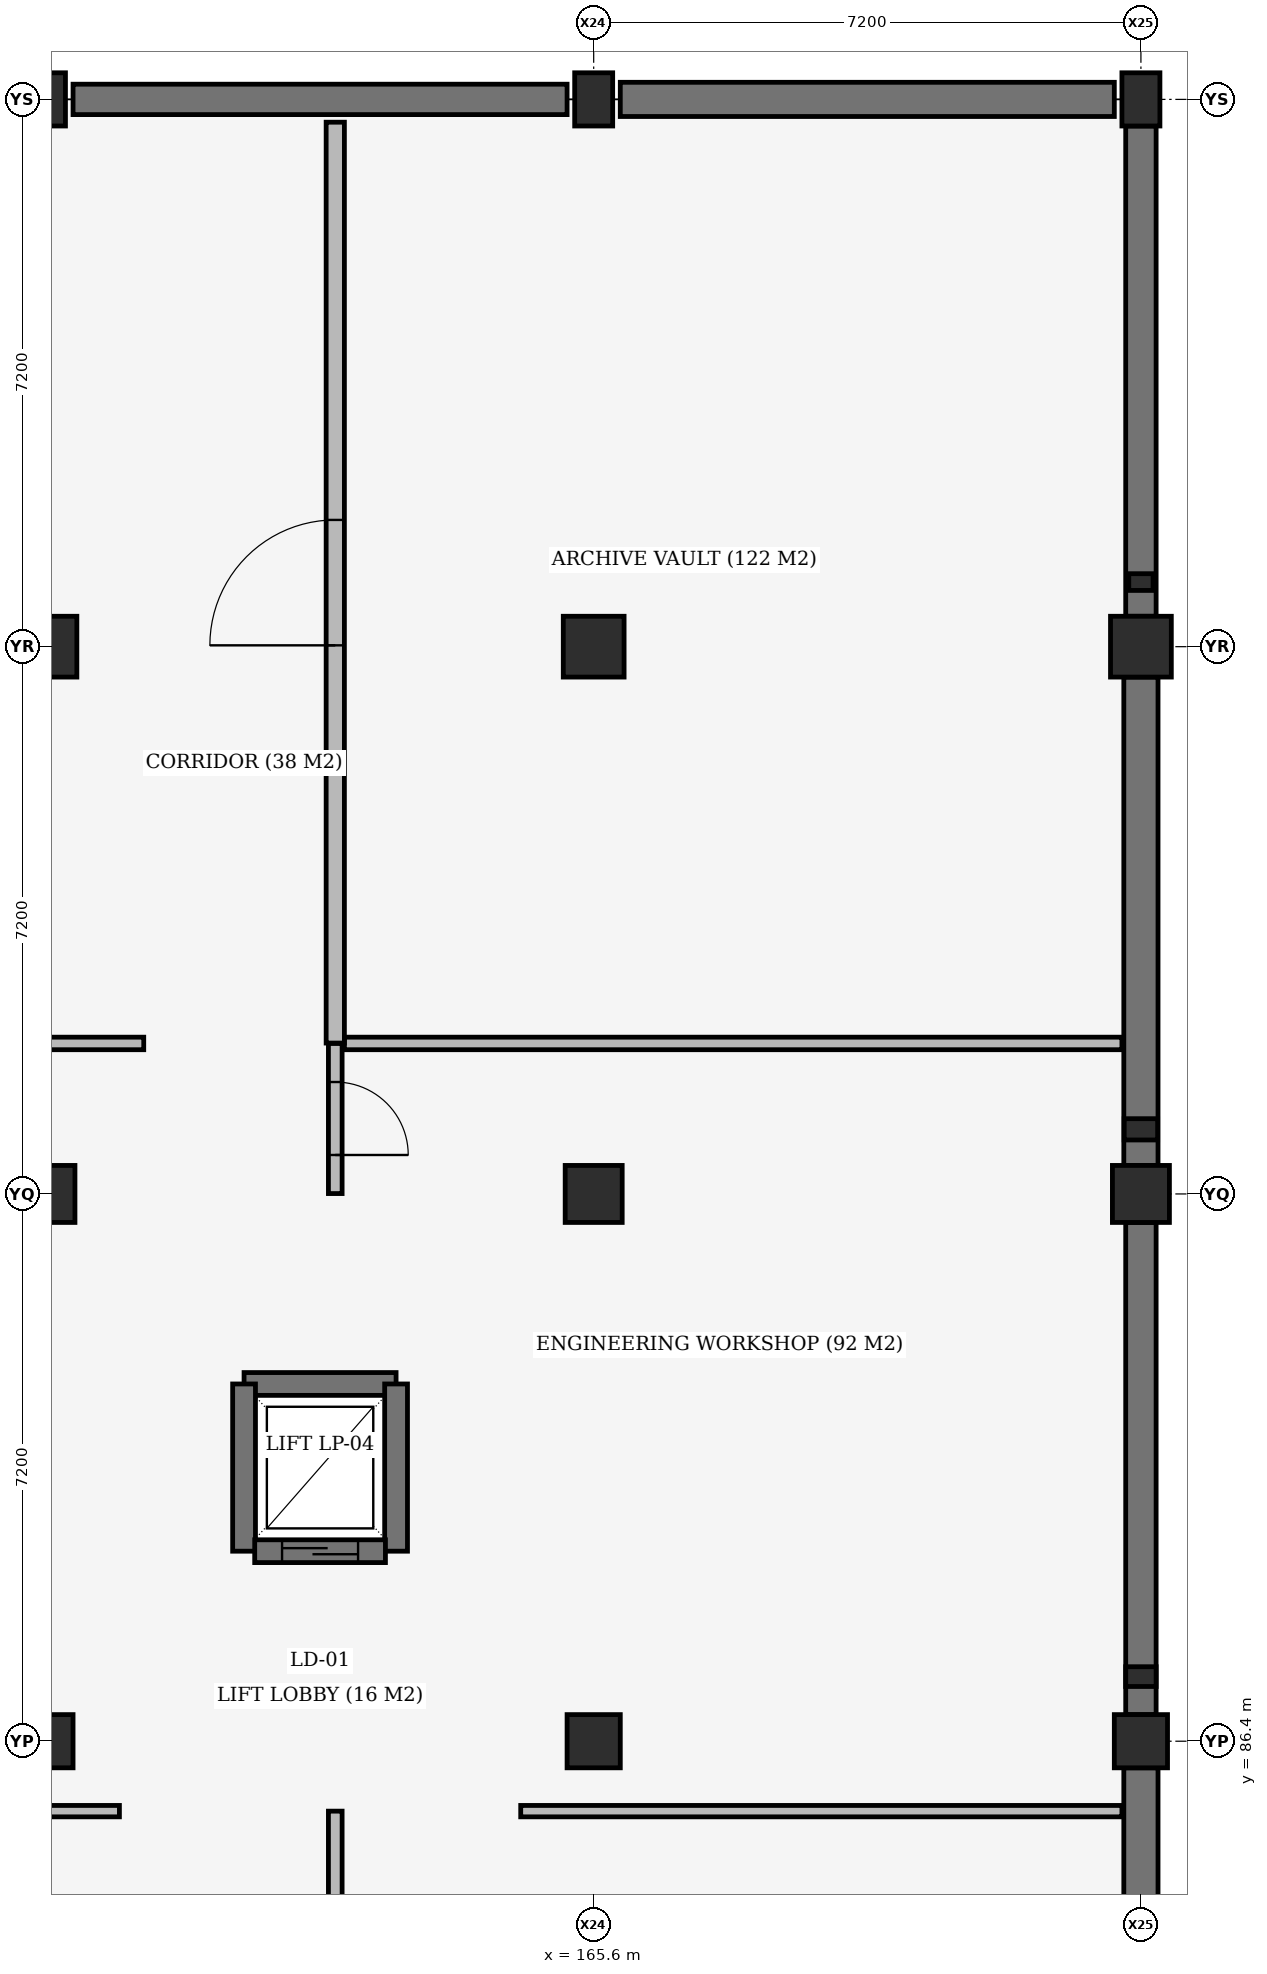
"""IFC4 building model, lengths in metres.
Left out: names, types, materials, properties, quantities, classifications, styles, units other than length and angle.
Written with IfcOpenShell. Run it as: python <this file> out.ifc"""

import sys

from ifc_helpers import new_model, si_unit, direction, frame, frame_2d, origin, origin_2d, place, context, subcontext, project, spatial, rectangle, extrude, element, fill, save


model = new_model("IFC4")
c1 = context("Model", 3, precision=1e-05, world=origin(), true_north=direction((0.0, 1.0)))
c2 = subcontext(c1, "Body", "Model", "MODEL_VIEW")
j1 = project(units=[si_unit("LENGTHUNIT", "METRE"), si_unit("PLANEANGLEUNIT", "RADIAN")], contexts=[c1])
p1 = place(None, origin())
s1 = spatial("IfcSite", under=j1, at=p1, CompositionType="ELEMENT")
p2 = place(p1, origin())
s2 = spatial("IfcBuilding", under=s1, at=p2, CompositionType="ELEMENT")
p3 = place(p2, frame((0.0, 0.0, -4.5)))
s3 = spatial("IfcBuildingStorey", under=s2, at=p3, CompositionType="ELEMENT", Elevation=-4.5)
p4 = place(p3, frame((158.4, 86.4, -0.42), z_axis=(0.0, 0.0, 1.0), x_axis=(1.0, 0.0, 0.0)))
e1 = element("IfcColumn", 1, at=p4, inside=s3, PredefinedType="COLUMN", context=c2, shape_type="SweptSolid", body=[
    extrude(rectangle(XDim=0.7, YDim=0.7, at=origin_2d()), origin(), (0.0, 0.0, 1.0), 4.6),
])
p5 = place(p3, frame((158.4, 93.6, -0.42), z_axis=(0.0, 0.0, 1.0), x_axis=(1.0, 0.0, 0.0)))
e2 = element("IfcColumn", 2, at=p5, inside=s3, PredefinedType="COLUMN", context=c2, shape_type="SweptSolid", body=[
    extrude(rectangle(XDim=0.75, YDim=0.75, at=origin_2d()), origin(), (0.0, 0.0, 1.0), 4.6),
])
p6 = place(p3, frame((158.4, 100.8, -0.42), z_axis=(0.0, 0.0, 1.0), x_axis=(1.0, 0.0, 0.0)))
e3 = element("IfcColumn", 3, at=p6, inside=s3, PredefinedType="COLUMN", context=c2, shape_type="SweptSolid", body=[
    extrude(rectangle(XDim=0.8, YDim=0.8, at=origin_2d()), origin(), (0.0, 0.0, 1.0), 4.6),
])
p7 = place(p3, frame((158.4, 108.0, -0.42), z_axis=(0.0, 0.0, 1.0), x_axis=(1.0, 0.0, 0.0)))
e4 = element("IfcColumn", 4, at=p7, inside=s3, PredefinedType="COLUMN", context=c2, shape_type="SweptSolid", body=[
    extrude(rectangle(XDim=0.5, YDim=0.7, at=origin_2d()), origin(), (0.0, 0.0, 1.0), 4.6),
])
p8 = place(p3, frame((165.6, 86.4, -0.42), z_axis=(0.0, 0.0, 1.0), x_axis=(1.0, 0.0, 0.0)))
e5 = element("IfcColumn", 5, at=p8, inside=s3, PredefinedType="COLUMN", context=c2, shape_type="SweptSolid", body=[
    extrude(rectangle(XDim=0.7, YDim=0.7, at=origin_2d()), origin(), (0.0, 0.0, 1.0), 4.6),
])
p9 = place(p3, frame((165.6, 93.6, -0.42), z_axis=(0.0, 0.0, 1.0), x_axis=(1.0, 0.0, 0.0)))
e6 = element("IfcColumn", 6, at=p9, inside=s3, PredefinedType="COLUMN", context=c2, shape_type="SweptSolid", body=[
    extrude(rectangle(XDim=0.75, YDim=0.75, at=origin_2d()), origin(), (0.0, 0.0, 1.0), 4.6),
])
p10 = place(p3, frame((165.6, 100.8, -0.42), z_axis=(0.0, 0.0, 1.0), x_axis=(1.0, 0.0, 0.0)))
e7 = element("IfcColumn", 7, at=p10, inside=s3, PredefinedType="COLUMN", context=c2, shape_type="SweptSolid", body=[
    extrude(rectangle(XDim=0.8, YDim=0.8, at=origin_2d()), origin(), (0.0, 0.0, 1.0), 4.6),
])
p11 = place(p3, frame((165.6, 108.0, -0.42), z_axis=(0.0, 0.0, 1.0), x_axis=(1.0, 0.0, 0.0)))
e8 = element("IfcColumn", 8, at=p11, inside=s3, PredefinedType="COLUMN", context=c2, shape_type="SweptSolid", body=[
    extrude(rectangle(XDim=0.5, YDim=0.7, at=origin_2d()), origin(), (0.0, 0.0, 1.0), 4.6),
])
p12 = place(p3, frame((172.8, 86.4, -0.42), z_axis=(0.0, 0.0, 1.0), x_axis=(1.0, 0.0, 0.0)))
e9 = element("IfcColumn", 9, at=p12, inside=s3, PredefinedType="COLUMN", context=c2, shape_type="SweptSolid", body=[
    extrude(rectangle(XDim=0.7, YDim=0.7, at=origin_2d()), origin(), (0.0, 0.0, 1.0), 4.6),
])
p13 = place(p3, frame((172.8, 93.6, -0.42), z_axis=(0.0, 0.0, 1.0), x_axis=(1.0, 0.0, 0.0)))
e10 = element("IfcColumn", 10, at=p13, inside=s3, PredefinedType="COLUMN", context=c2, shape_type="SweptSolid", body=[
    extrude(rectangle(XDim=0.75, YDim=0.75, at=origin_2d()), origin(), (0.0, 0.0, 1.0), 4.6),
])
p14 = place(p3, frame((172.8, 100.8, -0.42), z_axis=(0.0, 0.0, 1.0), x_axis=(1.0, 0.0, 0.0)))
e11 = element("IfcColumn", 11, at=p14, inside=s3, PredefinedType="COLUMN", context=c2, shape_type="SweptSolid", body=[
    extrude(rectangle(XDim=0.8, YDim=0.8, at=origin_2d()), origin(), (0.0, 0.0, 1.0), 4.6),
])
p15 = place(p3, frame((172.8, 108.0, -0.42), z_axis=(0.0, 0.0, 1.0), x_axis=(1.0, 0.0, 0.0)))
e12 = element("IfcColumn", 12, at=p15, inside=s3, PredefinedType="COLUMN", context=c2, shape_type="SweptSolid", body=[
    extrude(rectangle(XDim=0.5, YDim=0.7, at=origin_2d()), origin(), (0.0, 0.0, 1.0), 4.6),
])
p16 = place(p3, frame((172.8, 87.25, -0.42), z_axis=(0.0, 0.0, 1.0), x_axis=(1.0, 0.0, 0.0)))
e13 = element("IfcColumn", 13, at=p16, inside=s3, PredefinedType="PILASTER", context=c2, shape_type="SweptSolid", body=[
    extrude(rectangle(XDim=0.4, YDim=0.26, at=origin_2d()), origin(), (0.0, 0.0, 1.0), 4.6),
])
p17 = place(p3, frame((172.8, 94.45, -0.42), z_axis=(0.0, 0.0, 1.0), x_axis=(1.0, 0.0, 0.0)))
e14 = element("IfcColumn", 14, at=p17, inside=s3, PredefinedType="PILASTER", context=c2, shape_type="SweptSolid", body=[
    extrude(rectangle(XDim=0.44, YDim=0.28, at=origin_2d()), origin(), (0.0, 0.0, 1.0), 4.6),
])
p18 = place(p3, frame((172.8, 101.65, -0.42), z_axis=(0.0, 0.0, 1.0), x_axis=(1.0, 0.0, 0.0)))
e15 = element("IfcColumn", 15, at=p18, inside=s3, PredefinedType="PILASTER", context=c2, shape_type="SweptSolid", body=[
    extrude(rectangle(XDim=0.32, YDim=0.22, at=origin_2d()), origin(), (0.0, 0.0, 1.0), 4.6),
])
p19 = place(p3, frame((163.0, 91.1, 0.0), z_axis=(0.0, 0.0, 1.0), x_axis=(-1.0, 0.0, 0.0)))
e16 = element("IfcWall", 16, at=p19, inside=s3, PredefinedType="SHEAR", context=c2, shape_type="SweptSolid", body=[
    extrude(rectangle(XDim=2.0, YDim=0.3, at=frame_2d((1.0, 0.0))), origin(), (0.0, 0.0, 1.0), 4.18),
])
for number, where, z_axis, x_axis in (
    (17, (161.0, 91.1, 0.0), (0.0, 0.0, 1.0), (0.0, -1.0, 0.0)),
    (18, (163.0, 88.9, 0.0), (0.0, 0.0, 1.0), (0.0, 1.0, 0.0)),
):
    element("IfcWall", number, at=place(p3, frame(where, z_axis=z_axis, x_axis=x_axis)), inside=s3, PredefinedType="SHEAR", context=c2, shape_type="SweptSolid", body=[
        extrude(rectangle(XDim=2.2, YDim=0.3, at=frame_2d((1.1, 0.0))), origin(), (0.0, 0.0, 1.0), 4.18),
    ])
p20 = place(p3, frame((158.75, 108.0, 0.0), z_axis=(0.0, 0.0, 1.0), x_axis=(1.0, 0.0, 0.0)))
e19 = element("IfcWall", 19, at=p20, inside=s3, PredefinedType="USERDEFINED", context=c2, shape_type="SweptSolid", body=[
    extrude(rectangle(XDim=6.5, YDim=0.4, at=frame_2d((3.25, 0.0))), origin(), (0.0, 0.0, 1.0), 4.18),
])
p21 = place(p3, frame((165.95, 108.0, 0.0), z_axis=(0.0, 0.0, 1.0), x_axis=(1.0, 0.0, 0.0)))
e20 = element("IfcWall", 20, at=p21, inside=s3, PredefinedType="USERDEFINED", context=c2, shape_type="SweptSolid", body=[
    extrude(rectangle(XDim=6.5, YDim=0.45, at=frame_2d((3.25, 0.0))), origin(), (0.0, 0.0, 1.0), 4.18),
])
p22 = place(p3, frame((172.8, 83.125, 0.0), z_axis=(0.0, 0.0, 1.0), x_axis=(0.0, 1.0, 0.0)))
e21 = element("IfcWall", 21, at=p22, inside=s3, PredefinedType="USERDEFINED", context=c2, shape_type="SweptSolid", body=[
    extrude(rectangle(XDim=2.925, YDim=0.45, at=frame_2d((1.462, 0.0))), origin(), (0.0, 0.0, 1.0), 4.18),
])
p23 = place(p3, frame((172.8, 86.75, 0.0), z_axis=(0.0, 0.0, 1.0), x_axis=(0.0, 1.0, 0.0)))
e22 = element("IfcWall", 22, at=p23, inside=s3, PredefinedType="USERDEFINED", context=c2, shape_type="SweptSolid", body=[
    extrude(rectangle(XDim=6.475, YDim=0.4, at=frame_2d((3.238, 0.0))), origin(), (0.0, 0.0, 1.0), 4.18),
])
p24 = place(p3, frame((172.8, 93.975, 0.0), z_axis=(0.0, 0.0, 1.0), x_axis=(0.0, 1.0, 0.0)))
e23 = element("IfcWall", 23, at=p24, inside=s3, PredefinedType="USERDEFINED", context=c2, shape_type="SweptSolid", body=[
    extrude(rectangle(XDim=6.425, YDim=0.45, at=frame_2d((3.212, 0.0))), origin(), (0.0, 0.0, 1.0), 4.18),
])
p25 = place(p3, frame((172.8, 101.2, 0.0), z_axis=(0.0, 0.0, 1.0), x_axis=(0.0, 1.0, 0.0)))
e24 = element("IfcWall", 24, at=p25, inside=s3, PredefinedType="USERDEFINED", context=c2, shape_type="SweptSolid", body=[
    extrude(rectangle(XDim=6.45, YDim=0.4, at=frame_2d((3.225, 0.0))), origin(), (0.0, 0.0, 1.0), 4.18),
])
p26 = place(p3, frame((162.86, 88.9, 0.0), z_axis=(0.0, 0.0, 1.0), x_axis=(-1.0, 0.0, 0.0)))
e25 = element("IfcWall", 25, at=p26, inside=s3, PredefinedType="SHEAR", context=c2, shape_type="SweptSolid", body=[
    extrude(rectangle(XDim=1.72, YDim=0.3, at=frame_2d((0.86, 0.0))), origin(), (0.0, 0.0, 1.0), 4.18),
])
p27 = place(p26, frame((0.36, 0.0, 0.0)))
e26 = element("IfcOpeningElement", 26, at=p27, cuts=e25, PredefinedType="OPENING", context=c2, shape_type="SweptSolid", body=[
    extrude(rectangle(XDim=1.0, YDim=2.1, at=frame_2d((0.5, 1.05))), frame((0.0, 0.16, 0.0), z_axis=(0.0, -1.0, 0.0), x_axis=(1.0, 0.0, 0.0)), (0.0, 0.0, 1.0), 0.32),
])
p28 = place(p3, frame((136.885, 85.48, 0.0), z_axis=(0.0, 0.0, 1.0), x_axis=(1.0, 0.0, 0.0)))
e27 = element("IfcWall", 27, at=p28, inside=s3, PredefinedType="PARTITIONING", context=c2, shape_type="SweptSolid", body=[
    extrude(rectangle(XDim=22.475, YDim=0.15, at=frame_2d((11.238, 0.0))), origin(), (0.0, 0.0, 1.0), 3.38),
])
p29 = place(p3, frame((136.64, 95.58, 0.0), z_axis=(0.0, 0.0, 1.0), x_axis=(1.0, 0.0, 0.0)))
e28 = element("IfcWall", 28, at=p29, inside=s3, PredefinedType="PARTITIONING", context=c2, shape_type="SweptSolid", body=[
    extrude(rectangle(XDim=23.04, YDim=0.165, at=frame_2d((11.52, 0.0))), origin(), (0.0, 0.0, 1.0), 3.53),
])
p30 = place(p3, frame((162.2, 77.4, 0.0), z_axis=(0.0, 0.0, 1.0), x_axis=(0.0, 1.0, 0.0)))
e29 = element("IfcWall", 29, at=p30, inside=s3, PredefinedType="PARTITIONING", context=c2, shape_type="SweptSolid", body=[
    extrude(rectangle(XDim=8.08, YDim=0.18, at=frame_2d((4.04, 0.0))), origin(), (0.0, 0.0, 1.0), 3.48),
])
p31 = place(p30, frame((3.565, 0.0, 0.0)))
e30 = element("IfcOpeningElement", 30, at=p31, cuts=e29, PredefinedType="OPENING", context=c2, shape_type="SweptSolid", body=[
    extrude(rectangle(XDim=0.95, YDim=2.15, at=frame_2d((0.475, 1.075))), frame((0.0, 0.1, 0.0), z_axis=(0.0, -1.0, 0.0), x_axis=(1.0, 0.0, 0.0)), (0.0, 0.0, 1.0), 0.2),
])
p32 = place(p3, frame((164.64, 85.48, 0.0), z_axis=(0.0, 0.0, 1.0), x_axis=(1.0, 0.0, 0.0)))
e31 = element("IfcWall", 31, at=p32, inside=s3, PredefinedType="PARTITIONING", context=c2, shape_type="SweptSolid", body=[
    extrude(rectangle(XDim=7.91, YDim=0.15, at=frame_2d((3.955, 0.0))), origin(), (0.0, 0.0, 1.0), 3.53),
])
p33 = place(p3, frame((162.2, 93.605, 0.0), z_axis=(0.0, 0.0, 1.0), x_axis=(0.0, 1.0, 0.0)))
e32 = element("IfcWall", 32, at=p33, inside=s3, PredefinedType="PARTITIONING", context=c2, shape_type="SweptSolid", body=[
    extrude(rectangle(XDim=1.975, YDim=0.18, at=frame_2d((0.988, 0.0))), origin(), (0.0, 0.0, 1.0), 3.53),
])
p34 = place(p33, frame((0.508, 0.0, 0.0)))
e33 = element("IfcOpeningElement", 33, at=p34, cuts=e32, PredefinedType="OPENING", context=c2, shape_type="SweptSolid", body=[
    extrude(rectangle(XDim=0.96, YDim=2.15, at=frame_2d((0.48, 1.075))), frame((0.0, 0.1, 0.0), z_axis=(0.0, -1.0, 0.0), x_axis=(1.0, 0.0, 0.0)), (0.0, 0.0, 1.0), 0.2),
])
p35 = place(p3, frame((162.32, 95.58, 0.0), z_axis=(0.0, 0.0, 1.0), x_axis=(1.0, 0.0, 0.0)))
e34 = element("IfcWall", 34, at=p35, inside=s3, PredefinedType="PARTITIONING", context=c2, shape_type="SweptSolid", body=[
    extrude(rectangle(XDim=10.23, YDim=0.165, at=frame_2d((5.115, 0.0))), origin(), (0.0, 0.0, 1.0), 3.43),
])
p36 = place(p3, frame((162.2, 95.585, 0.0), z_axis=(0.0, 0.0, 1.0), x_axis=(0.0, 1.0, 0.0)))
e35 = element("IfcWall", 35, at=p36, inside=s3, PredefinedType="STANDARD", context=c2, shape_type="SweptSolid", body=[
    extrude(rectangle(XDim=12.115, YDim=0.24, at=frame_2d((6.058, 0.0))), origin(), (0.0, 0.0, 1.0), 3.43),
])
p37 = place(p36, frame((5.232, 0.0, 0.0)))
e36 = element("IfcOpeningElement", 36, at=p37, cuts=e35, PredefinedType="OPENING", context=c2, shape_type="SweptSolid", body=[
    extrude(rectangle(XDim=1.65, YDim=2.25, at=frame_2d((0.825, 1.125))), frame((0.0, 0.13, 0.0), z_axis=(0.0, -1.0, 0.0), x_axis=(1.0, 0.0, 0.0)), (0.0, 0.0, 1.0), 0.26),
])
p38 = place(p27, origin())
e37 = element("IfcDoor", 37, at=p38, inside=s3, OperationType="SLIDING_TO_LEFT", PredefinedType="DOOR", context=c2, shape_type="SweptSolid", body=[
    extrude(rectangle(XDim=1.0, YDim=2.1, at=frame_2d((0.5, 1.05))), frame((0.0, 0.025, 0.0), z_axis=(0.0, -1.0, 0.0), x_axis=(1.0, 0.0, 0.0)), (0.0, 0.0, 1.0), 0.05),
])
fill(e26, e37)
p39 = place(p34, origin())
e38 = element("IfcDoor", 38, at=p39, inside=s3, OperationType="SINGLE_SWING_RIGHT", PredefinedType="DOOR", context=c2, shape_type="SweptSolid", body=[
    extrude(rectangle(XDim=0.96, YDim=2.15, at=frame_2d((0.48, 1.075))), frame((0.0, 0.025, 0.0), z_axis=(0.0, -1.0, 0.0), x_axis=(1.0, 0.0, 0.0)), (0.0, 0.0, 1.0), 0.05),
])
fill(e33, e38)
p40 = place(p37, origin())
e39 = element("IfcDoor", 39, at=p40, inside=s3, OperationType="DOUBLE_DOOR_SINGLE_SWING", PredefinedType="DOOR", context=c2, shape_type="SweptSolid", body=[
    extrude(rectangle(XDim=1.65, YDim=2.25, at=frame_2d((0.825, 1.125))), frame((0.0, 0.025, 0.0), z_axis=(0.0, -1.0, 0.0), x_axis=(1.0, 0.0, 0.0)), (0.0, 0.0, 1.0), 0.05),
])
fill(e36, e39)
save(model, sys.argv[1])
